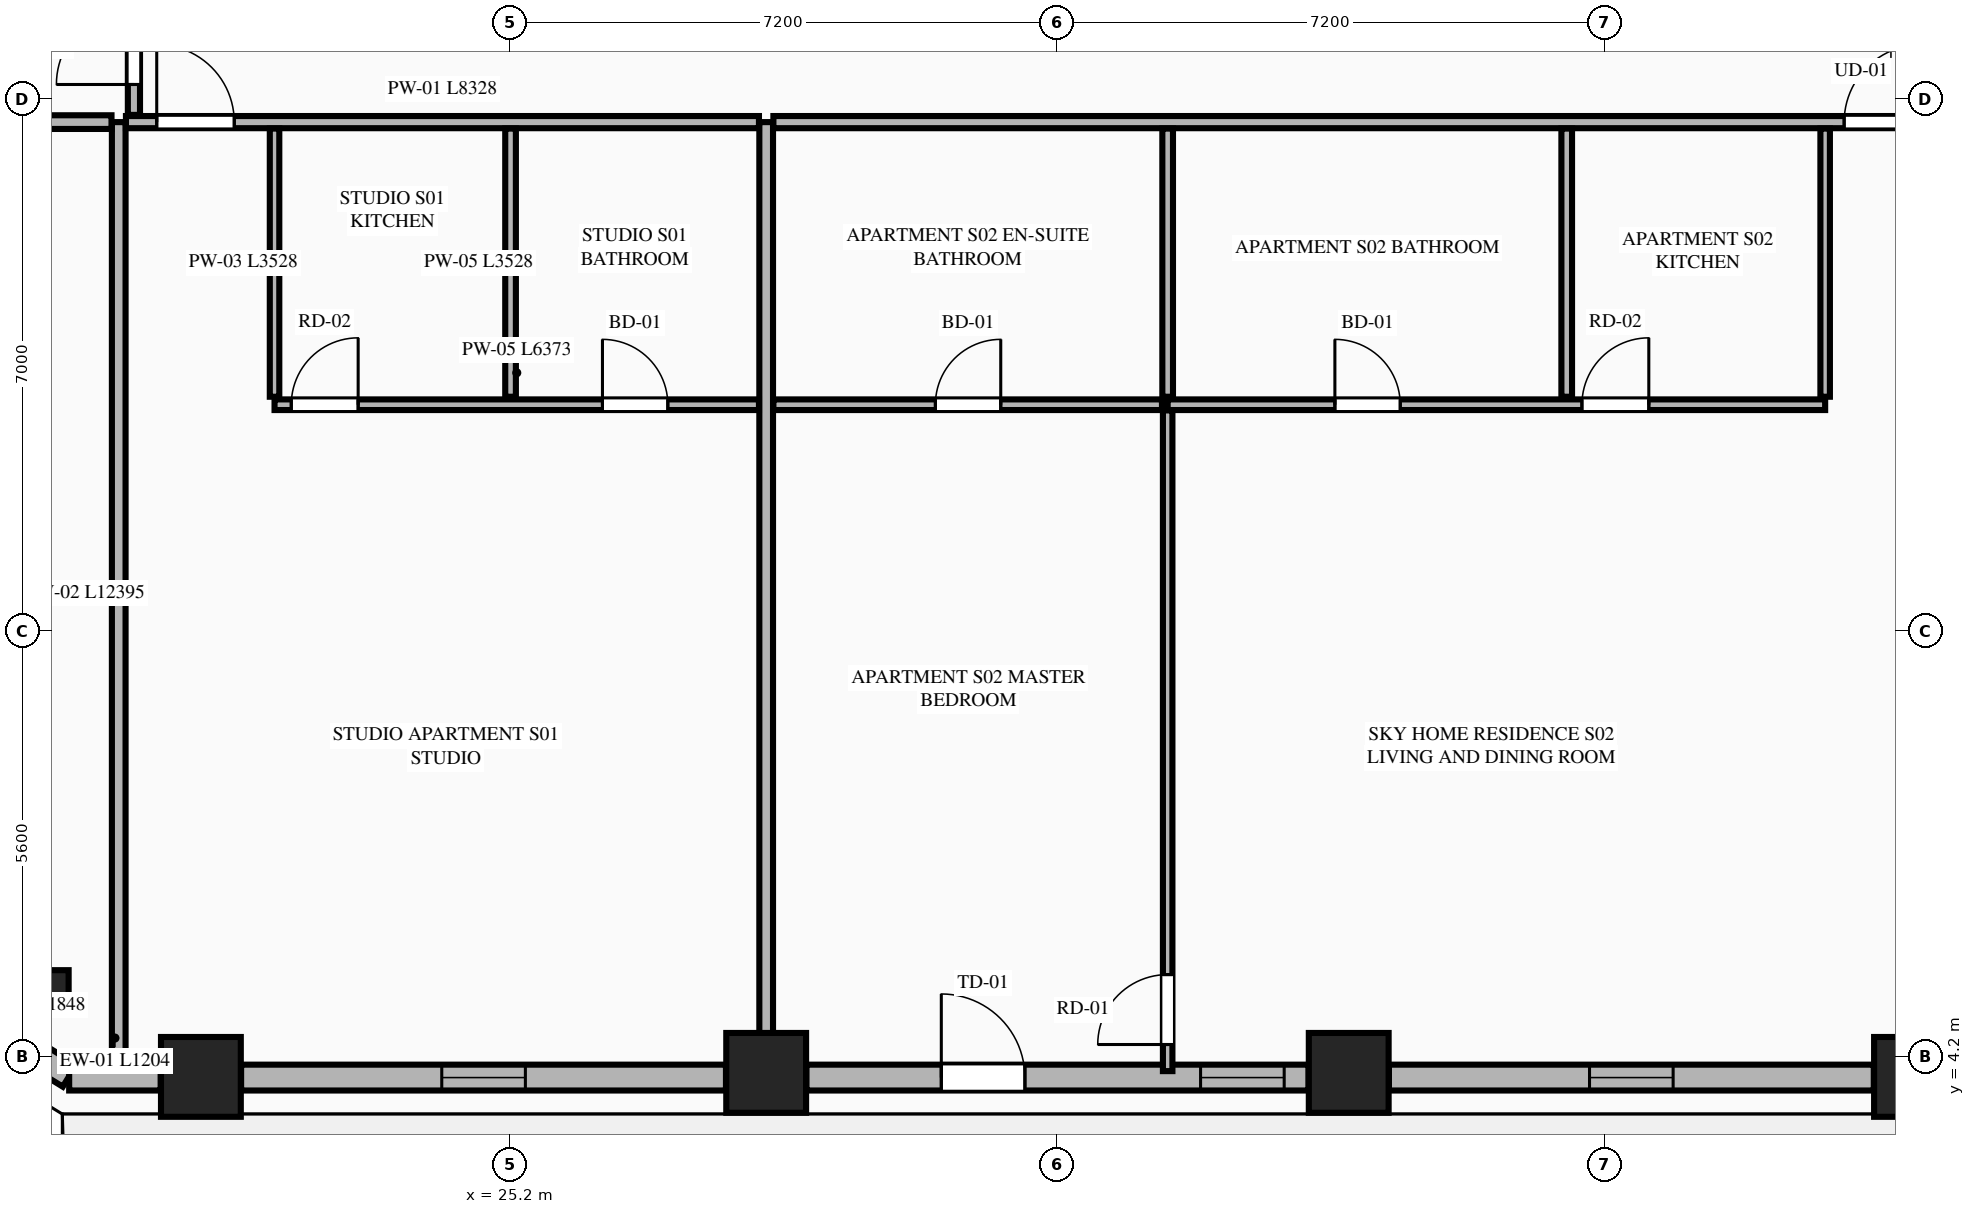
"""IFC4 building model, lengths in metres.
Left out: names, types, materials, properties, quantities, classifications, styles, units other than length and angle.
Written with IfcOpenShell. Run it as: python <this file> out.ifc"""

import sys

from ifc_helpers import new_model, si_unit, direction, frame, frame_2d, origin, origin_2d, place, context, subcontext, project, spatial, rectangle, extrude, element, fill, save


model = new_model("IFC4")
c1 = context("Model", 3, precision=1e-05, world=origin(), true_north=direction((0.0, 1.0)))
c2 = subcontext(c1, "Body", "Model", "MODEL_VIEW")
j1 = project(units=[si_unit("LENGTHUNIT", "METRE"), si_unit("PLANEANGLEUNIT", "RADIAN")], contexts=[c1])
p1 = place(None, origin())
s1 = spatial("IfcSite", under=j1, at=p1, CompositionType="ELEMENT")
p2 = place(p1, origin())
s2 = spatial("IfcBuilding", under=s1, at=p2, CompositionType="ELEMENT")
p3 = place(p2, frame((0.0, 0.0, 137.45)))
s3 = spatial("IfcBuildingStorey", under=s2, at=p3, CompositionType="ELEMENT", Elevation=137.45)
for number, where, z_axis, x_axis in (
    (1, (21.131, 3.939, 0.0), (0.0, 0.0, 1.0), (1.0, 0.0, 0.0)),
    (2, (28.568, 3.992, 0.0), (0.0, 0.0, 1.0), (1.0, 0.0, 0.0)),
    (3, (36.232, 3.992, 0.0), (0.0, 0.0, 1.0), (1.0, 0.0, 0.0)),
    (4, (43.669, 3.939, 0.0), (0.0, 0.0, 1.0), (1.0, 0.0, 0.0)),
):
    element("IfcColumn", number, at=place(p3, frame(where, z_axis=z_axis, x_axis=x_axis)), inside=s3, PredefinedType="COLUMN", context=c2, shape_type="SweptSolid", body=[
        extrude(rectangle(XDim=1.05, YDim=1.05, at=origin_2d()), origin(), (0.0, 0.0, 1.0), 3.55),
    ])
p4 = place(p3, frame((19.141, 5.093, 0.0), z_axis=(0.0, 0.0, 1.0), x_axis=(0.865160173452, -0.501495637342, 0.0)))
e5 = element("IfcColumn", 5, at=p4, inside=s3, PredefinedType="PILASTER", context=c2, shape_type="SweptSolid", body=[
    extrude(rectangle(XDim=0.5, YDim=0.35, at=origin_2d()), origin(), (0.0, 0.0, 1.0), 3.55),
])
p5 = place(p3, frame((17.829, 4.923, 0.0), z_axis=(0.0, 0.0, 1.0), x_axis=(0.851798915137, -0.523868884523, 0.0)))
e6 = element("IfcWall", 6, at=p5, inside=s3, PredefinedType="STANDARD", context=c2, shape_type="SweptSolid", body=[
    extrude(rectangle(XDim=1.848, YDim=0.34, at=frame_2d((0.924, 0.0))), origin(), (0.0, 0.0, 1.0), 3.34),
])
p6 = place(p3, frame((19.398, 3.93, 0.0), z_axis=(0.0, 0.0, 1.0), x_axis=(1.0, 0.0, 0.0)))
e7 = element("IfcWall", 7, at=p6, inside=s3, PredefinedType="STANDARD", context=c2, shape_type="SweptSolid", body=[
    extrude(rectangle(XDim=1.204, YDim=0.34, at=frame_2d((0.602, 0.0))), origin(), (0.0, 0.0, 1.0), 3.34),
])
p7 = place(p3, frame((21.66, 3.93, 0.0), z_axis=(0.0, 0.0, 1.0), x_axis=(1.0, 0.0, 0.0)))
e8 = element("IfcWall", 8, at=p7, inside=s3, PredefinedType="STANDARD", context=c2, shape_type="SweptSolid", body=[
    extrude(rectangle(XDim=6.379, YDim=0.34, at=frame_2d((3.189, 0.0))), origin(), (0.0, 0.0, 1.0), 2.797),
])
p8 = place(p7, frame((2.64, 0.0, 0.75)))
e9 = element("IfcOpeningElement", 9, at=p8, cuts=e8, PredefinedType="OPENING", context=c2, shape_type="SweptSolid", body=[
    extrude(rectangle(XDim=1.1, YDim=1.897, at=frame_2d((0.55, 0.948))), frame((0.0, 0.18, 0.0), z_axis=(0.0, -1.0, 0.0), x_axis=(1.0, 0.0, 0.0)), (0.0, 0.0, 1.0), 0.36),
])
p9 = place(p3, frame((29.097, 3.93, 0.0), z_axis=(0.0, 0.0, 1.0), x_axis=(1.0, 0.0, 0.0)))
e10 = element("IfcWall", 10, at=p9, inside=s3, PredefinedType="STANDARD", context=c2, shape_type="SweptSolid", body=[
    extrude(rectangle(XDim=6.606, YDim=0.34, at=frame_2d((3.303, 0.0))), origin(), (0.0, 0.0, 1.0), 2.797),
])
p10 = place(p9, frame((1.775, 0.0, 0.0)))
e11 = element("IfcOpeningElement", 11, at=p10, cuts=e10, PredefinedType="OPENING", context=c2, shape_type="SweptSolid", body=[
    extrude(rectangle(XDim=1.1, YDim=2.25, at=frame_2d((0.55, 1.125))), frame((0.0, 0.18, 0.0), z_axis=(0.0, -1.0, 0.0), x_axis=(1.0, 0.0, 0.0)), (0.0, 0.0, 1.0), 0.36),
])
p11 = place(p9, frame((5.186, 0.0, 0.75)))
e12 = element("IfcOpeningElement", 12, at=p11, cuts=e10, PredefinedType="OPENING", context=c2, shape_type="SweptSolid", body=[
    extrude(rectangle(XDim=1.1, YDim=1.897, at=frame_2d((0.55, 0.948))), frame((0.0, 0.18, 0.0), z_axis=(0.0, -1.0, 0.0), x_axis=(1.0, 0.0, 0.0)), (0.0, 0.0, 1.0), 0.36),
])
p12 = place(p3, frame((36.761, 3.93, 0.0), z_axis=(0.0, 0.0, 1.0), x_axis=(1.0, 0.0, 0.0)))
e13 = element("IfcWall", 13, at=p12, inside=s3, PredefinedType="STANDARD", context=c2, shape_type="SweptSolid", body=[
    extrude(rectangle(XDim=6.379, YDim=0.34, at=frame_2d((3.189, 0.0))), origin(), (0.0, 0.0, 1.0), 2.797),
])
p13 = place(p12, frame((2.639, 0.0, 0.75)))
e14 = element("IfcOpeningElement", 14, at=p13, cuts=e13, PredefinedType="OPENING", context=c2, shape_type="SweptSolid", body=[
    extrude(rectangle(XDim=1.1, YDim=1.897, at=frame_2d((0.55, 0.948))), frame((0.0, 0.18, 0.0), z_axis=(0.0, -1.0, 0.0), x_axis=(1.0, 0.0, 0.0)), (0.0, 0.0, 1.0), 0.36),
])
p14 = place(p3, frame((20.05, 4.105, 0.0), z_axis=(0.0, 0.0, 1.0), x_axis=(0.0, 1.0, 0.0)))
e15 = element("IfcWall", 15, at=p14, inside=s3, PredefinedType="PARTITIONING", context=c2, shape_type="SweptSolid", body=[
    extrude(rectangle(XDim=12.395, YDim=0.18, at=frame_2d((6.198, 0.0))), origin(), (0.0, 0.0, 1.0), 3.34),
])
p15 = place(p3, frame((28.568, 4.105, 0.0), z_axis=(0.0, 0.0, 1.0), x_axis=(0.0, 1.0, 0.0)))
e16 = element("IfcWall", 16, at=p15, inside=s3, PredefinedType="PARTITIONING", context=c2, shape_type="SweptSolid", body=[
    extrude(rectangle(XDim=12.395, YDim=0.18, at=frame_2d((6.198, 0.0))), origin(), (0.0, 0.0, 1.0), 2.722),
])
p16 = place(p3, frame((20.145, 16.5, 0.0), z_axis=(0.0, 0.0, 1.0), x_axis=(1.0, 0.0, 0.0)))
e17 = element("IfcWall", 17, at=p16, inside=s3, PredefinedType="PARTITIONING", context=c2, shape_type="SweptSolid", body=[
    extrude(rectangle(XDim=8.328, YDim=0.16, at=frame_2d((4.164, 0.0))), origin(), (0.0, 0.0, 1.0), 3.34),
])
p17 = place(p16, frame((0.405, 0.0, 0.0)))
e18 = element("IfcOpeningElement", 18, at=p17, cuts=e17, PredefinedType="OPENING", context=c2, shape_type="SweptSolid", body=[
    extrude(rectangle(XDim=1.02, YDim=2.25, at=frame_2d((0.51, 1.125))), frame((0.0, 0.09, 0.0), z_axis=(0.0, -1.0, 0.0), x_axis=(1.0, 0.0, 0.0)), (0.0, 0.0, 1.0), 0.18),
])
p18 = place(p3, frame((22.1, 12.887, 0.0), z_axis=(0.0, 0.0, 1.0), x_axis=(0.0, 1.0, 0.0)))
e19 = element("IfcWall", 19, at=p18, inside=s3, PredefinedType="PARTITIONING", context=c2, shape_type="SweptSolid", body=[
    extrude(rectangle(XDim=3.528, YDim=0.125, at=frame_2d((1.764, 0.0))), origin(), (0.0, 0.0, 1.0), 2.722),
])
p19 = place(p3, frame((22.1, 12.782, 0.0), z_axis=(0.0, 0.0, 1.0), x_axis=(1.0, 0.0, 0.0)))
e20 = element("IfcWall", 20, at=p19, inside=s3, PredefinedType="PLUMBINGWALL", context=c2, shape_type="SweptSolid", body=[
    extrude(rectangle(XDim=6.373, YDim=0.14, at=frame_2d((3.187, 0.0))), origin(), (0.0, 0.0, 1.0), 3.34),
])
p20 = place(p19, frame((4.314, 0.0, 0.0)))
e21 = element("IfcOpeningElement", 21, at=p20, cuts=e20, PredefinedType="OPENING", context=c2, shape_type="SweptSolid", body=[
    extrude(rectangle(XDim=0.86, YDim=2.1, at=frame_2d((0.43, 1.05))), frame((0.0, 0.08, 0.0), z_axis=(0.0, -1.0, 0.0), x_axis=(1.0, 0.0, 0.0)), (0.0, 0.0, 1.0), 0.16),
])
p21 = place(p19, frame((0.22, 0.0, 0.0)))
e22 = element("IfcOpeningElement", 22, at=p21, cuts=e20, PredefinedType="OPENING", context=c2, shape_type="SweptSolid", body=[
    extrude(rectangle(XDim=0.88, YDim=2.15, at=frame_2d((0.44, 1.075))), frame((0.0, 0.08, 0.0), z_axis=(0.0, -1.0, 0.0), x_axis=(1.0, 0.0, 0.0)), (0.0, 0.0, 1.0), 0.16),
])
p22 = place(p3, frame((25.205, 12.887, 0.0), z_axis=(0.0, 0.0, 1.0), x_axis=(0.0, 1.0, 0.0)))
e23 = element("IfcWall", 23, at=p22, inside=s3, PredefinedType="PLUMBINGWALL", context=c2, shape_type="SweptSolid", body=[
    extrude(rectangle(XDim=3.528, YDim=0.14, at=frame_2d((1.764, 0.0))), origin(), (0.0, 0.0, 1.0), 3.34),
])
p23 = place(p3, frame((28.663, 16.5, 0.0), z_axis=(0.0, 0.0, 1.0), x_axis=(1.0, 0.0, 0.0)))
e24 = element("IfcWall", 24, at=p23, inside=s3, PredefinedType="PARTITIONING", context=c2, shape_type="SweptSolid", body=[
    extrude(rectangle(XDim=15.992, YDim=0.16, at=frame_2d((7.996, 0.0))), origin(), (0.0, 0.0, 1.0), 3.34),
])
p24 = place(p23, frame((14.087, 0.0, 0.0)))
e25 = element("IfcOpeningElement", 25, at=p24, cuts=e24, PredefinedType="OPENING", context=c2, shape_type="SweptSolid", body=[
    extrude(rectangle(XDim=1.02, YDim=2.25, at=frame_2d((0.51, 1.125))), frame((0.0, 0.09, 0.0), z_axis=(0.0, -1.0, 0.0), x_axis=(1.0, 0.0, 0.0)), (0.0, 0.0, 1.0), 0.18),
])
p25 = place(p3, frame((42.5, 12.887, 0.0), z_axis=(0.0, 0.0, 1.0), x_axis=(0.0, 1.0, 0.0)))
e26 = element("IfcWall", 26, at=p25, inside=s3, PredefinedType="PARTITIONING", context=c2, shape_type="SweptSolid", body=[
    extrude(rectangle(XDim=3.528, YDim=0.125, at=frame_2d((1.764, 0.0))), origin(), (0.0, 0.0, 1.0), 2.722),
])
p26 = place(p3, frame((33.85, 12.782, 0.0), z_axis=(0.0, 0.0, 1.0), x_axis=(1.0, 0.0, 0.0)))
e27 = element("IfcWall", 27, at=p26, inside=s3, PredefinedType="PLUMBINGWALL", context=c2, shape_type="SweptSolid", body=[
    extrude(rectangle(XDim=8.65, YDim=0.14, at=frame_2d((4.325, 0.0))), origin(), (0.0, 0.0, 1.0), 3.34),
])
p27 = place(p26, frame((2.2, 0.0, 0.0)))
e28 = element("IfcOpeningElement", 28, at=p27, cuts=e27, PredefinedType="OPENING", context=c2, shape_type="SweptSolid", body=[
    extrude(rectangle(XDim=0.86, YDim=2.1, at=frame_2d((0.43, 1.05))), frame((0.0, 0.08, 0.0), z_axis=(0.0, -1.0, 0.0), x_axis=(1.0, 0.0, 0.0)), (0.0, 0.0, 1.0), 0.16),
])
p28 = place(p26, frame((5.45, 0.0, 0.0)))
e29 = element("IfcOpeningElement", 29, at=p28, cuts=e27, PredefinedType="OPENING", context=c2, shape_type="SweptSolid", body=[
    extrude(rectangle(XDim=0.88, YDim=2.15, at=frame_2d((0.44, 1.075))), frame((0.0, 0.08, 0.0), z_axis=(0.0, -1.0, 0.0), x_axis=(1.0, 0.0, 0.0)), (0.0, 0.0, 1.0), 0.16),
])
p29 = place(p3, frame((28.663, 12.782, 0.0), z_axis=(0.0, 0.0, 1.0), x_axis=(1.0, 0.0, 0.0)))
e30 = element("IfcWall", 30, at=p29, inside=s3, PredefinedType="PLUMBINGWALL", context=c2, shape_type="SweptSolid", body=[
    extrude(rectangle(XDim=5.112, YDim=0.14, at=frame_2d((2.556, 0.0))), origin(), (0.0, 0.0, 1.0), 3.34),
])
p30 = place(p29, frame((2.131, 0.0, 0.0)))
e31 = element("IfcOpeningElement", 31, at=p30, cuts=e30, PredefinedType="OPENING", context=c2, shape_type="SweptSolid", body=[
    extrude(rectangle(XDim=0.86, YDim=2.1, at=frame_2d((0.43, 1.05))), frame((0.0, 0.08, 0.0), z_axis=(0.0, -1.0, 0.0), x_axis=(1.0, 0.0, 0.0)), (0.0, 0.0, 1.0), 0.16),
])
for number, where, z_axis, x_axis in (
    (32, (39.1, 12.887, 0.0), (0.0, 0.0, 1.0), (0.0, 1.0, 0.0)),
    (33, (33.85, 12.887, 0.0), (0.0, 0.0, 1.0), (0.0, 1.0, 0.0)),
):
    element("IfcWall", number, at=place(p3, frame(where, z_axis=z_axis, x_axis=x_axis)), inside=s3, PredefinedType="PLUMBINGWALL", context=c2, shape_type="SweptSolid", body=[
        extrude(rectangle(XDim=3.528, YDim=0.14, at=frame_2d((1.764, 0.0))), origin(), (0.0, 0.0, 1.0), 3.34),
    ])
p31 = place(p3, frame((33.85, 4.015, 0.0), z_axis=(0.0, 0.0, 1.0), x_axis=(0.0, 1.0, 0.0)))
e34 = element("IfcWall", 34, at=p31, inside=s3, PredefinedType="PARTITIONING", context=c2, shape_type="SweptSolid", body=[
    extrude(rectangle(XDim=8.692, YDim=0.125, at=frame_2d((4.346, 0.0))), origin(), (0.0, 0.0, 1.0), 3.34),
])
p32 = place(p31, frame((0.35, 0.0, 0.0)))
e35 = element("IfcOpeningElement", 35, at=p32, cuts=e34, PredefinedType="OPENING", context=c2, shape_type="SweptSolid", body=[
    extrude(rectangle(XDim=0.92, YDim=2.15, at=frame_2d((0.46, 1.075))), frame((0.0, 0.073, 0.0), z_axis=(0.0, -1.0, 0.0), x_axis=(1.0, 0.0, 0.0)), (0.0, 0.0, 1.0), 0.145),
])
p33 = place(p3, frame((12.185, 16.5, 0.0), z_axis=(0.0, 0.0, 1.0), x_axis=(1.0, 0.0, 0.0)))
e36 = element("IfcWall", 36, at=p33, inside=s3, PredefinedType="PARTITIONING", context=c2, shape_type="SweptSolid", body=[
    extrude(rectangle(XDim=7.77, YDim=0.18, at=frame_2d((3.885, 0.0))), origin(), (0.0, 0.0, 1.0), 3.34),
])
p34 = place(p3, frame((20.25, 16.595, 0.0), z_axis=(0.0, 0.0, 1.0), x_axis=(0.0, 1.0, 0.0)))
e37 = element("IfcWall", 37, at=p34, inside=s3, PredefinedType="PARTITIONING", context=c2, shape_type="SweptSolid", body=[
    extrude(rectangle(XDim=6.202, YDim=0.16, at=frame_2d((3.101, 0.0))), origin(), (0.0, 0.0, 1.0), 3.34),
])
p35 = place(p34, frame((0.4, 0.0, 0.0)))
e38 = element("IfcOpeningElement", 38, at=p35, cuts=e37, PredefinedType="OPENING", context=c2, shape_type="SweptSolid", body=[
    extrude(rectangle(XDim=1.02, YDim=2.25, at=frame_2d((0.51, 1.125))), frame((0.0, 0.09, 0.0), z_axis=(0.0, -1.0, 0.0), x_axis=(1.0, 0.0, 0.0)), (0.0, 0.0, 1.0), 0.18),
])
p36 = place(p8, origin())
e39 = element("IfcWindow", 39, at=p36, inside=s3, PartitioningType="SINGLE_PANEL", PredefinedType="WINDOW", context=c2, shape_type="SweptSolid", body=[
    extrude(rectangle(XDim=1.1, YDim=1.897, at=frame_2d((0.55, 0.948))), frame((0.0, 0.03, 0.0), z_axis=(0.0, -1.0, 0.0), x_axis=(1.0, 0.0, 0.0)), (0.0, 0.0, 1.0), 0.06),
])
fill(e9, e39)
p37 = place(p10, origin())
e40 = element("IfcDoor", 40, at=p37, inside=s3, OperationType="SINGLE_SWING_LEFT", PredefinedType="DOOR", context=c2, shape_type="SweptSolid", body=[
    extrude(rectangle(XDim=1.1, YDim=2.25, at=frame_2d((0.55, 1.125))), frame((0.0, 0.025, 0.0), z_axis=(0.0, -1.0, 0.0), x_axis=(1.0, 0.0, 0.0)), (0.0, 0.0, 1.0), 0.05),
])
fill(e11, e40)
p38 = place(p13, origin())
e41 = element("IfcWindow", 41, at=p38, inside=s3, PartitioningType="SINGLE_PANEL", PredefinedType="WINDOW", context=c2, shape_type="SweptSolid", body=[
    extrude(rectangle(XDim=1.1, YDim=1.897, at=frame_2d((0.55, 0.948))), frame((0.0, 0.03, 0.0), z_axis=(0.0, -1.0, 0.0), x_axis=(1.0, 0.0, 0.0)), (0.0, 0.0, 1.0), 0.06),
])
fill(e14, e41)
p39 = place(p20, origin())
e42 = element("IfcDoor", 42, at=p39, inside=s3, OperationType="SINGLE_SWING_LEFT", PredefinedType="DOOR", context=c2, shape_type="SweptSolid", body=[
    extrude(rectangle(XDim=0.86, YDim=2.1, at=frame_2d((0.43, 1.05))), frame((0.0, 0.025, 0.0), z_axis=(0.0, -1.0, 0.0), x_axis=(1.0, 0.0, 0.0)), (0.0, 0.0, 1.0), 0.05),
])
fill(e21, e42)
p40 = place(p17, origin())
e43 = element("IfcDoor", 43, at=p40, inside=s3, OperationType="SINGLE_SWING_LEFT", PredefinedType="DOOR", context=c2, shape_type="SweptSolid", body=[
    extrude(rectangle(XDim=1.02, YDim=2.25, at=frame_2d((0.51, 1.125))), frame((0.0, 0.025, 0.0), z_axis=(0.0, -1.0, 0.0), x_axis=(1.0, 0.0, 0.0)), (0.0, 0.0, 1.0), 0.05),
])
fill(e18, e43)
p41 = place(p21, origin())
e44 = element("IfcDoor", 44, at=p41, inside=s3, OperationType="SINGLE_SWING_RIGHT", PredefinedType="DOOR", context=c2, shape_type="SweptSolid", body=[
    extrude(rectangle(XDim=0.88, YDim=2.15, at=frame_2d((0.44, 1.075))), frame((0.0, 0.025, 0.0), z_axis=(0.0, -1.0, 0.0), x_axis=(1.0, 0.0, 0.0)), (0.0, 0.0, 1.0), 0.05),
])
fill(e22, e44)
p42 = place(p27, origin())
e45 = element("IfcDoor", 45, at=p42, inside=s3, OperationType="SINGLE_SWING_LEFT", PredefinedType="DOOR", context=c2, shape_type="SweptSolid", body=[
    extrude(rectangle(XDim=0.86, YDim=2.1, at=frame_2d((0.43, 1.05))), frame((0.0, 0.025, 0.0), z_axis=(0.0, -1.0, 0.0), x_axis=(1.0, 0.0, 0.0)), (0.0, 0.0, 1.0), 0.05),
])
fill(e28, e45)
p43 = place(p30, origin())
e46 = element("IfcDoor", 46, at=p43, inside=s3, OperationType="SINGLE_SWING_RIGHT", PredefinedType="DOOR", context=c2, shape_type="SweptSolid", body=[
    extrude(rectangle(XDim=0.86, YDim=2.1, at=frame_2d((0.43, 1.05))), frame((0.0, 0.025, 0.0), z_axis=(0.0, -1.0, 0.0), x_axis=(1.0, 0.0, 0.0)), (0.0, 0.0, 1.0), 0.05),
])
fill(e31, e46)
p44 = place(p24, origin())
e47 = element("IfcDoor", 47, at=p44, inside=s3, OperationType="SINGLE_SWING_RIGHT", PredefinedType="DOOR", context=c2, shape_type="SweptSolid", body=[
    extrude(rectangle(XDim=1.02, YDim=2.25, at=frame_2d((0.51, 1.125))), frame((0.0, 0.025, 0.0), z_axis=(0.0, -1.0, 0.0), x_axis=(1.0, 0.0, 0.0)), (0.0, 0.0, 1.0), 0.05),
])
fill(e25, e47)
p45 = place(p28, origin())
e48 = element("IfcDoor", 48, at=p45, inside=s3, OperationType="SINGLE_SWING_RIGHT", PredefinedType="DOOR", context=c2, shape_type="SweptSolid", body=[
    extrude(rectangle(XDim=0.88, YDim=2.15, at=frame_2d((0.44, 1.075))), frame((0.0, 0.025, 0.0), z_axis=(0.0, -1.0, 0.0), x_axis=(1.0, 0.0, 0.0)), (0.0, 0.0, 1.0), 0.05),
])
fill(e29, e48)
p46 = place(p32, origin())
e49 = element("IfcDoor", 49, at=p46, inside=s3, OperationType="SINGLE_SWING_LEFT", PredefinedType="DOOR", context=c2, shape_type="SweptSolid", body=[
    extrude(rectangle(XDim=0.92, YDim=2.15, at=frame_2d((0.46, 1.075))), frame((0.0, 0.025, 0.0), z_axis=(0.0, -1.0, 0.0), x_axis=(1.0, 0.0, 0.0)), (0.0, 0.0, 1.0), 0.05),
])
fill(e35, e49)
p47 = place(p35, origin())
e50 = element("IfcDoor", 50, at=p47, inside=s3, OperationType="SINGLE_SWING_LEFT", PredefinedType="DOOR", context=c2, shape_type="SweptSolid", body=[
    extrude(rectangle(XDim=1.02, YDim=2.25, at=frame_2d((0.51, 1.125))), frame((0.0, 0.025, 0.0), z_axis=(0.0, -1.0, 0.0), x_axis=(1.0, 0.0, 0.0)), (0.0, 0.0, 1.0), 0.05),
])
fill(e38, e50)
p48 = place(p11, origin())
e51 = element("IfcWindow", 51, at=p48, inside=s3, PartitioningType="SINGLE_PANEL", PredefinedType="WINDOW", context=c2, shape_type="SweptSolid", body=[
    extrude(rectangle(XDim=1.1, YDim=1.897, at=frame_2d((0.55, 0.948))), frame((0.0, 0.03, 0.0), z_axis=(0.0, -1.0, 0.0), x_axis=(1.0, 0.0, 0.0)), (0.0, 0.0, 1.0), 0.06),
])
fill(e12, e51)
save(model, sys.argv[1])
